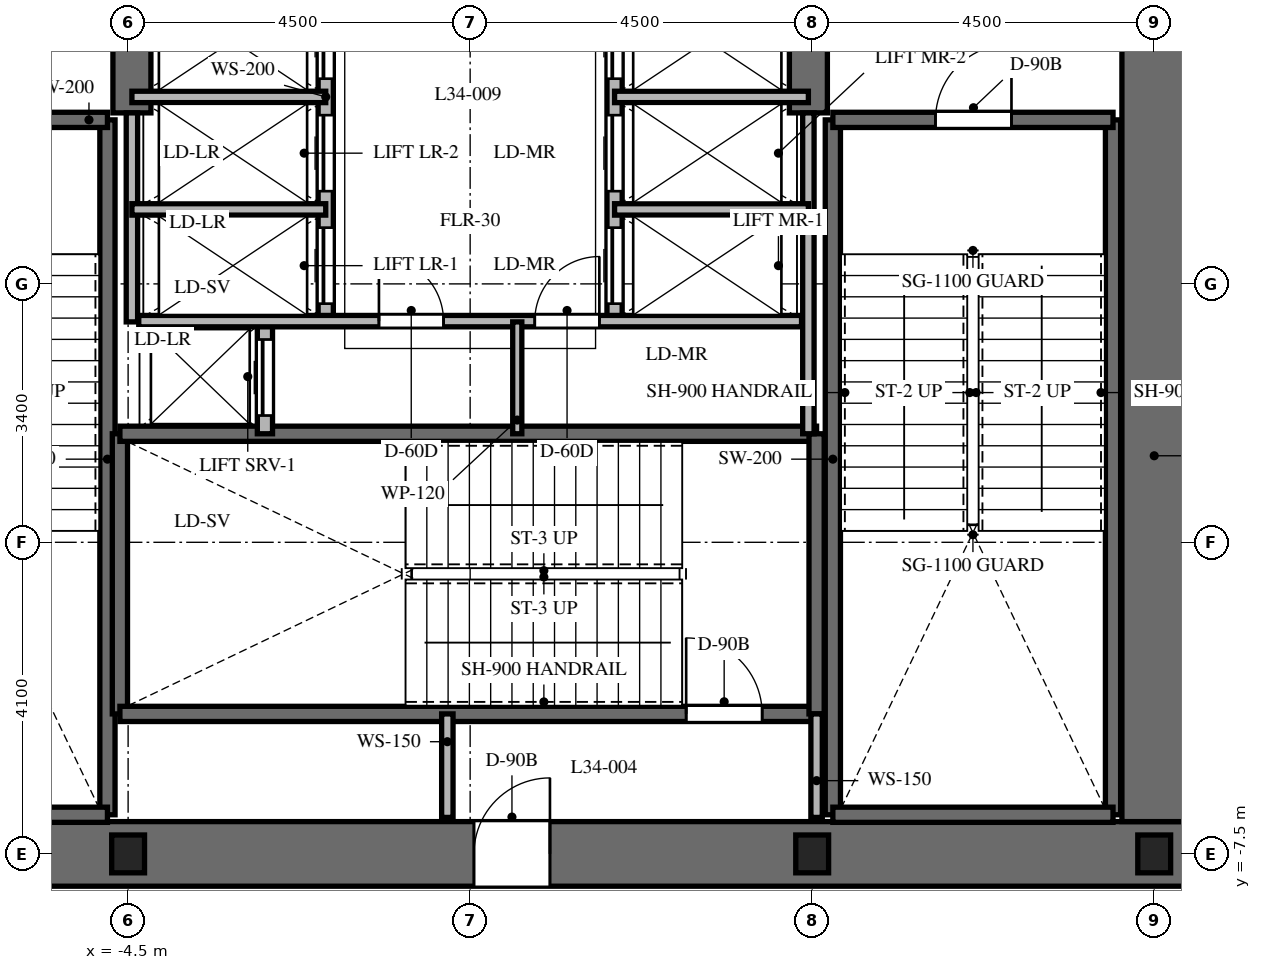
"""IFC4 building model, lengths in metres.
Left out: names, types, materials, properties, quantities, classifications, styles, units other than length and angle.
Written with IfcOpenShell. Run it as: python <this file> out.ifc"""

import sys

from ifc_helpers import new_model, si_unit, direction, frame, frame_2d, origin, origin_2d, place, context, subcontext, project, spatial, rectangle, i_section, extrude, element, fill, save


model = new_model("IFC4")
c1 = context("Model", 3, precision=1e-05, world=origin(), true_north=direction((0.0, 1.0)))
c2 = subcontext(c1, "Body", "Model", "MODEL_VIEW")
j1 = project(units=[si_unit("LENGTHUNIT", "METRE"), si_unit("PLANEANGLEUNIT", "RADIAN")], contexts=[c1])
p1 = place(None, origin())
s1 = spatial("IfcSite", under=j1, at=p1, CompositionType="ELEMENT")
p2 = place(p1, origin())
s2 = spatial("IfcBuilding", under=s1, at=p2, CompositionType="ELEMENT")
p3 = place(p2, frame((0.0, 0.0, 139.5)))
s3 = spatial("IfcBuildingStorey", under=s2, at=p3, CompositionType="ELEMENT", Elevation=139.5)
p4 = place(p3, frame((-9.425, -7.5, 0.0), z_axis=(0.0, 0.0, 1.0), x_axis=(1.0, 0.0, 0.0)))
e1 = element("IfcWall", 1, at=p4, inside=s3, PredefinedType="SHEAR", context=c2, shape_type="SweptSolid", body=[
    extrude(rectangle(XDim=18.85, YDim=0.85, at=frame_2d((9.425, 0.0))), origin(), (0.0, 0.0, 1.0), 4.8),
])
p5 = place(p4, frame((9.475, 0.0, 0.0)))
e2 = element("IfcOpeningElement", 2, at=p5, cuts=e1, PredefinedType="OPENING", context=c2, shape_type="SweptSolid", body=[
    extrude(rectangle(XDim=1.0, YDim=2.15, at=frame_2d((0.5, 1.075))), frame((0.0, 0.435, 0.0), z_axis=(0.0, -1.0, 0.0), x_axis=(1.0, 0.0, 0.0)), (0.0, 0.0, 1.0), 0.87),
])
p6 = place(p3, frame((9.0, -7.075, 0.0), z_axis=(0.0, 0.0, 1.0), x_axis=(0.0, 1.0, 0.0)))
e3 = element("IfcWall", 3, at=p6, inside=s3, PredefinedType="SHEAR", context=c2, shape_type="SweptSolid", body=[
    extrude(rectangle(XDim=14.15, YDim=0.85, at=frame_2d((7.075, 0.0))), origin(), (0.0, 0.0, 1.0), 4.8),
])
p7 = place(p6, frame((10.2, 0.0, 0.0)))
e4 = element("IfcOpeningElement", 4, at=p7, cuts=e3, PredefinedType="OPENING", context=c2, shape_type="SweptSolid", body=[
    extrude(rectangle(XDim=1.05, YDim=2.15, at=frame_2d((0.525, 1.075))), frame((0.0, 0.435, 0.0), z_axis=(0.0, -1.0, 0.0), x_axis=(1.0, 0.0, 0.0)), (0.0, 0.0, 1.0), 0.87),
])
for number, where, z_axis, x_axis in (
    (5, (-4.45, 2.25, 0.0), (0.0, 0.0, 1.0), (0.0, 1.0, 0.0)),
    (6, (4.45, 2.25, 0.0), (0.0, 0.0, 1.0), (0.0, 1.0, 0.0)),
):
    element("IfcWall", number, at=place(p3, frame(where, z_axis=z_axis, x_axis=x_axis)), inside=s3, PredefinedType="SHEAR", context=c2, shape_type="SweptSolid", body=[
        extrude(rectangle(XDim=4.825, YDim=0.5, at=frame_2d((2.413, 0.0))), origin(), (0.0, 0.0, 1.0), 4.8),
    ])
p8 = place(p3, frame((-4.772, -6.985, 0.0), z_axis=(0.0, 0.0, 1.0), x_axis=(0.0, 1.0, 0.0)))
e7 = element("IfcWall", 7, at=p8, inside=s3, PredefinedType="SHEAR", context=c2, shape_type="SweptSolid", body=[
    extrude(rectangle(XDim=9.143, YDim=0.2, at=frame_2d((4.572, 0.0))), origin(), (0.0, 0.0, 1.0), 4.8),
])
p9 = place(p3, frame((-8.458, -6.985, 0.0), z_axis=(0.0, 0.0, 1.0), x_axis=(1.0, 0.0, 0.0)))
e8 = element("IfcWall", 8, at=p9, inside=s3, PredefinedType="SHEAR", context=c2, shape_type="SweptSolid", body=[
    extrude(rectangle(XDim=3.686, YDim=0.2, at=frame_2d((1.843, 0.0))), origin(), (0.0, 0.0, 1.0), 4.8),
])
p10 = place(p3, frame((-8.458, 2.158, 0.0), z_axis=(0.0, 0.0, 1.0), x_axis=(1.0, 0.0, 0.0)))
e9 = element("IfcWall", 9, at=p10, inside=s3, PredefinedType="SHEAR", context=c2, shape_type="SweptSolid", body=[
    extrude(rectangle(XDim=3.686, YDim=0.2, at=frame_2d((1.843, 0.0))), origin(), (0.0, 0.0, 1.0), 4.8),
])
p11 = place(p10, frame((1.3, 0.0, 0.0)))
e10 = element("IfcOpeningElement", 10, at=p11, cuts=e9, PredefinedType="OPENING", context=c2, shape_type="SweptSolid", body=[
    extrude(rectangle(XDim=1.0, YDim=2.15, at=frame_2d((0.5, 1.075))), frame((0.0, 0.11, 0.0), z_axis=(0.0, -1.0, 0.0), x_axis=(1.0, 0.0, 0.0)), (0.0, 0.0, 1.0), 0.22),
])
for number, where, z_axis, x_axis in (
    (11, (4.772, -6.985, 0.0), (0.0, 0.0, 1.0), (0.0, 1.0, 0.0)),
    (12, (8.458, -6.985, 0.0), (0.0, 0.0, 1.0), (0.0, 1.0, 0.0)),
):
    element("IfcWall", number, at=place(p3, frame(where, z_axis=z_axis, x_axis=x_axis)), inside=s3, PredefinedType="SHEAR", context=c2, shape_type="SweptSolid", body=[
        extrude(rectangle(XDim=9.143, YDim=0.2, at=frame_2d((4.572, 0.0))), origin(), (0.0, 0.0, 1.0), 4.8),
    ])
p12 = place(p3, frame((4.772, -6.985, 0.0), z_axis=(0.0, 0.0, 1.0), x_axis=(1.0, 0.0, 0.0)))
e13 = element("IfcWall", 13, at=p12, inside=s3, PredefinedType="SHEAR", context=c2, shape_type="SweptSolid", body=[
    extrude(rectangle(XDim=3.686, YDim=0.2, at=frame_2d((1.843, 0.0))), origin(), (0.0, 0.0, 1.0), 4.8),
])
p13 = place(p3, frame((4.772, 2.158, 0.0), z_axis=(0.0, 0.0, 1.0), x_axis=(1.0, 0.0, 0.0)))
e14 = element("IfcWall", 14, at=p13, inside=s3, PredefinedType="SHEAR", context=c2, shape_type="SweptSolid", body=[
    extrude(rectangle(XDim=3.686, YDim=0.2, at=frame_2d((1.843, 0.0))), origin(), (0.0, 0.0, 1.0), 4.8),
])
p14 = place(p13, frame((1.35, 0.0, 0.0)))
e15 = element("IfcOpeningElement", 15, at=p14, cuts=e14, PredefinedType="OPENING", context=c2, shape_type="SweptSolid", body=[
    extrude(rectangle(XDim=1.0, YDim=2.15, at=frame_2d((0.5, 1.075))), frame((0.0, 0.11, 0.0), z_axis=(0.0, -1.0, 0.0), x_axis=(1.0, 0.0, 0.0)), (0.0, 0.0, 1.0), 0.22),
])
p15 = place(p3, frame((-4.608, -5.658, 0.0), z_axis=(0.0, 0.0, 1.0), x_axis=(0.0, 1.0, 0.0)))
e16 = element("IfcWall", 16, at=p15, inside=s3, PredefinedType="SHEAR", context=c2, shape_type="SweptSolid", body=[
    extrude(rectangle(XDim=3.686, YDim=0.2, at=frame_2d((1.843, 0.0))), origin(), (0.0, 0.0, 1.0), 4.8),
])
p16 = place(p3, frame((-4.608, -5.658, 0.0), z_axis=(0.0, 0.0, 1.0), x_axis=(1.0, 0.0, 0.0)))
e17 = element("IfcWall", 17, at=p16, inside=s3, PredefinedType="SHEAR", context=c2, shape_type="SweptSolid", body=[
    extrude(rectangle(XDim=9.166, YDim=0.2, at=frame_2d((4.583, 0.0))), origin(), (0.0, 0.0, 1.0), 4.8),
])
p17 = place(p16, frame((7.45, 0.0, 0.0)))
e18 = element("IfcOpeningElement", 18, at=p17, cuts=e17, PredefinedType="OPENING", context=c2, shape_type="SweptSolid", body=[
    extrude(rectangle(XDim=1.0, YDim=2.15, at=frame_2d((0.5, 1.075))), frame((0.0, 0.11, 0.0), z_axis=(0.0, -1.0, 0.0), x_axis=(1.0, 0.0, 0.0)), (0.0, 0.0, 1.0), 0.22),
])
p18 = place(p3, frame((-4.608, -1.972, 0.0), z_axis=(0.0, 0.0, 1.0), x_axis=(1.0, 0.0, 0.0)))
e19 = element("IfcWall", 19, at=p18, inside=s3, PredefinedType="SHEAR", context=c2, shape_type="SweptSolid", body=[
    extrude(rectangle(XDim=9.166, YDim=0.2, at=frame_2d((4.583, 0.0))), origin(), (0.0, 0.0, 1.0), 4.8),
])
p19 = place(p3, frame((4.558, -5.658, 0.0), z_axis=(0.0, 0.0, 1.0), x_axis=(0.0, 1.0, 0.0)))
e20 = element("IfcWall", 20, at=p19, inside=s3, PredefinedType="SHEAR", context=c2, shape_type="SweptSolid", body=[
    extrude(rectangle(XDim=3.686, YDim=0.2, at=frame_2d((1.843, 0.0))), origin(), (0.0, 0.0, 1.0), 4.8),
])
for number, where, z_axis, x_axis in (
    (21, (-4.5, -7.5, 0.0), (0.0, 0.0, 1.0), (1.0, 0.0, 0.0)),
    (22, (4.5, -7.5, 0.0), (0.0, 0.0, 1.0), (1.0, 0.0, 0.0)),
    (23, (9.0, -7.5, 0.0), (0.0, 0.0, 1.0), (1.0, 0.0, 0.0)),
):
    element("IfcColumn", number, at=place(p3, frame(where, z_axis=z_axis, x_axis=x_axis)), inside=s3, PredefinedType="COLUMN", context=c2, shape_type="SweptSolid", body=[
        extrude(i_section(OverallWidth=0.432, OverallDepth=0.498, WebThickness=0.056, FlangeThickness=0.089, at=origin_2d()), origin(), (0.0, 0.0, 1.0), 4.8),
    ])
for number, where, z_axis, x_axis in (
    (24, (-0.3, -7.02, 0.0), (0.0, 0.0, 1.0), (0.0, 1.0, 0.0)),
    (25, (4.558, -7.02, 0.0), (0.0, 0.0, 1.0), (0.0, 1.0, 0.0)),
):
    element("IfcWall", number, at=place(p3, frame(where, z_axis=z_axis, x_axis=x_axis)), inside=s3, PredefinedType="PARTITIONING", context=c2, shape_type="SweptSolid", body=[
        extrude(rectangle(XDim=1.362, YDim=0.15, at=frame_2d((0.681, 0.0))), origin(), (0.0, 0.0, 1.0), 4.5),
    ])
p20 = place(p3, frame((-2.7, -1.972, 0.0), z_axis=(0.0, 0.0, 1.0), x_axis=(0.0, 1.0, 0.0)))
e26 = element("IfcWall", 26, at=p20, inside=s3, PredefinedType="PARTITIONING", context=c2, shape_type="SweptSolid", body=[
    extrude(rectangle(XDim=1.472, YDim=0.2, at=frame_2d((0.736, 0.0))), origin(), (0.0, 0.0, 1.0), 4.5),
])
p21 = place(p20, frame((0.24, 0.0, 0.0)))
e27 = element("IfcOpeningElement", 27, at=p21, cuts=e26, PredefinedType="OPENING", context=c2, shape_type="SweptSolid", body=[
    extrude(rectangle(XDim=1.0, YDim=2.2, at=frame_2d((0.5, 1.1))), frame((0.0, 0.11, 0.0), z_axis=(0.0, -1.0, 0.0), x_axis=(1.0, 0.0, 0.0)), (0.0, 0.0, 1.0), 0.22),
])
p22 = place(p3, frame((-4.45, -0.5, 0.0), z_axis=(0.0, 0.0, 1.0), x_axis=(0.0, 1.0, 0.0)))
e28 = element("IfcWall", 28, at=p22, inside=s3, PredefinedType="PARTITIONING", context=c2, shape_type="SweptSolid", body=[
    extrude(rectangle(XDim=2.75, YDim=0.15, at=frame_2d((1.375, 0.0))), origin(), (0.0, 0.0, 1.0), 4.5),
])
p23 = place(p3, frame((4.45, -1.972, 0.0), z_axis=(0.0, 0.0, 1.0), x_axis=(0.0, 1.0, 0.0)))
e29 = element("IfcWall", 29, at=p23, inside=s3, PredefinedType="PARTITIONING", context=c2, shape_type="SweptSolid", body=[
    extrude(rectangle(XDim=4.222, YDim=0.15, at=frame_2d((2.111, 0.0))), origin(), (0.0, 0.0, 1.0), 4.5),
])
p24 = place(p3, frame((-1.9, -0.5, 0.0), z_axis=(0.0, 0.0, 1.0), x_axis=(0.0, 1.0, 0.0)))
e30 = element("IfcWall", 30, at=p24, inside=s3, PredefinedType="PARTITIONING", context=c2, shape_type="SweptSolid", body=[
    extrude(rectangle(XDim=4.44, YDim=0.2, at=frame_2d((2.22, 0.0))), origin(), (0.0, 0.0, 1.0), 4.5),
])
p25 = place(p24, frame((0.24, 0.0, 0.0)))
e31 = element("IfcOpeningElement", 31, at=p25, cuts=e30, PredefinedType="OPENING", context=c2, shape_type="SweptSolid", body=[
    extrude(rectangle(XDim=1.0, YDim=2.2, at=frame_2d((0.5, 1.1))), frame((0.0, 0.11, 0.0), z_axis=(0.0, -1.0, 0.0), x_axis=(1.0, 0.0, 0.0)), (0.0, 0.0, 1.0), 0.22),
])
p26 = place(p24, frame((1.72, 0.0, 0.0)))
e32 = element("IfcOpeningElement", 32, at=p26, cuts=e30, PredefinedType="OPENING", context=c2, shape_type="SweptSolid", body=[
    extrude(rectangle(XDim=1.0, YDim=2.2, at=frame_2d((0.5, 1.1))), frame((0.0, 0.11, 0.0), z_axis=(0.0, -1.0, 0.0), x_axis=(1.0, 0.0, 0.0)), (0.0, 0.0, 1.0), 0.22),
])
p27 = place(p24, frame((3.2, 0.0, 0.0)))
e33 = element("IfcOpeningElement", 33, at=p27, cuts=e30, PredefinedType="OPENING", context=c2, shape_type="SweptSolid", body=[
    extrude(rectangle(XDim=1.0, YDim=2.2, at=frame_2d((0.5, 1.1))), frame((0.0, 0.11, 0.0), z_axis=(0.0, -1.0, 0.0), x_axis=(1.0, 0.0, 0.0)), (0.0, 0.0, 1.0), 0.22),
])
for number, where, z_axis, x_axis in (
    (34, (-4.45, 0.98, 0.0), (0.0, 0.0, 1.0), (1.0, 0.0, 0.0)),
    (35, (-4.45, 2.46, 0.0), (0.0, 0.0, 1.0), (1.0, 0.0, 0.0)),
):
    element("IfcWall", number, at=place(p3, frame(where, z_axis=z_axis, x_axis=x_axis)), inside=s3, PredefinedType="PARTITIONING", context=c2, shape_type="SweptSolid", body=[
        extrude(rectangle(XDim=2.55, YDim=0.15, at=frame_2d((1.275, 0.0))), origin(), (0.0, 0.0, 1.0), 4.5),
    ])
p28 = place(p3, frame((1.9, -0.5, 0.0), z_axis=(0.0, 0.0, 1.0), x_axis=(0.0, 1.0, 0.0)))
e36 = element("IfcWall", 36, at=p28, inside=s3, PredefinedType="PARTITIONING", context=c2, shape_type="SweptSolid", body=[
    extrude(rectangle(XDim=4.44, YDim=0.2, at=frame_2d((2.22, 0.0))), origin(), (0.0, 0.0, 1.0), 4.5),
])
p29 = place(p28, frame((0.24, 0.0, 0.0)))
e37 = element("IfcOpeningElement", 37, at=p29, cuts=e36, PredefinedType="OPENING", context=c2, shape_type="SweptSolid", body=[
    extrude(rectangle(XDim=1.0, YDim=2.2, at=frame_2d((0.5, 1.1))), frame((0.0, 0.11, 0.0), z_axis=(0.0, -1.0, 0.0), x_axis=(1.0, 0.0, 0.0)), (0.0, 0.0, 1.0), 0.22),
])
p30 = place(p28, frame((1.72, 0.0, 0.0)))
e38 = element("IfcOpeningElement", 38, at=p30, cuts=e36, PredefinedType="OPENING", context=c2, shape_type="SweptSolid", body=[
    extrude(rectangle(XDim=1.0, YDim=2.2, at=frame_2d((0.5, 1.1))), frame((0.0, 0.11, 0.0), z_axis=(0.0, -1.0, 0.0), x_axis=(1.0, 0.0, 0.0)), (0.0, 0.0, 1.0), 0.22),
])
p31 = place(p28, frame((3.2, 0.0, 0.0)))
e39 = element("IfcOpeningElement", 39, at=p31, cuts=e36, PredefinedType="OPENING", context=c2, shape_type="SweptSolid", body=[
    extrude(rectangle(XDim=1.0, YDim=2.2, at=frame_2d((0.5, 1.1))), frame((0.0, 0.11, 0.0), z_axis=(0.0, -1.0, 0.0), x_axis=(1.0, 0.0, 0.0)), (0.0, 0.0, 1.0), 0.22),
])
for number, where, z_axis, x_axis in (
    (40, (1.9, 0.98, 0.0), (0.0, 0.0, 1.0), (1.0, 0.0, 0.0)),
    (41, (1.9, 2.46, 0.0), (0.0, 0.0, 1.0), (1.0, 0.0, 0.0)),
):
    element("IfcWall", number, at=place(p3, frame(where, z_axis=z_axis, x_axis=x_axis)), inside=s3, PredefinedType="PARTITIONING", context=c2, shape_type="SweptSolid", body=[
        extrude(rectangle(XDim=2.55, YDim=0.15, at=frame_2d((1.275, 0.0))), origin(), (0.0, 0.0, 1.0), 4.5),
    ])
p32 = place(p3, frame((-4.36, -0.49, 0.0), z_axis=(0.0, 0.0, 1.0), x_axis=(1.0, 0.0, 0.0)))
e42 = element("IfcWall", 42, at=p32, inside=s3, PredefinedType="PARTITIONING", context=c2, shape_type="SweptSolid", body=[
    extrude(rectangle(XDim=8.72, YDim=0.15, at=frame_2d((4.36, 0.0))), origin(), (0.0, 0.0, 1.0), 4.5),
])
p33 = place(p32, frame((3.16, 0.0, 0.0)))
e43 = element("IfcOpeningElement", 43, at=p33, cuts=e42, PredefinedType="OPENING", context=c2, shape_type="SweptSolid", body=[
    extrude(rectangle(XDim=0.85, YDim=2.03, at=frame_2d((0.425, 1.015))), frame((0.0, 0.085, 0.0), z_axis=(0.0, -1.0, 0.0), x_axis=(1.0, 0.0, 0.0)), (0.0, 0.0, 1.0), 0.17),
])
p34 = place(p32, frame((5.21, 0.0, 0.0)))
e44 = element("IfcOpeningElement", 44, at=p34, cuts=e42, PredefinedType="OPENING", context=c2, shape_type="SweptSolid", body=[
    extrude(rectangle(XDim=0.85, YDim=2.03, at=frame_2d((0.425, 1.015))), frame((0.0, 0.085, 0.0), z_axis=(0.0, -1.0, 0.0), x_axis=(1.0, 0.0, 0.0)), (0.0, 0.0, 1.0), 0.17),
])
p35 = place(p3, frame((0.62, -1.972, 0.0), z_axis=(0.0, 0.0, 1.0), x_axis=(0.0, 1.0, 0.0)))
e45 = element("IfcWall", 45, at=p35, inside=s3, PredefinedType="PARTITIONING", context=c2, shape_type="SweptSolid", body=[
    extrude(rectangle(XDim=1.472, YDim=0.12, at=frame_2d((0.736, 0.0))), origin(), (0.0, 0.0, 1.0), 4.5),
])
p36 = place(p14, origin())
e46 = element("IfcDoor", 46, at=p36, inside=s3, OperationType="SINGLE_SWING_RIGHT", PredefinedType="DOOR", context=c2, shape_type="SweptSolid", body=[
    extrude(rectangle(XDim=1.0, YDim=2.15, at=frame_2d((0.5, 1.075))), frame((0.0, 0.025, 0.0), z_axis=(0.0, -1.0, 0.0), x_axis=(1.0, 0.0, 0.0)), (0.0, 0.0, 1.0), 0.05),
])
fill(e15, e46)
p37 = place(p17, origin())
e47 = element("IfcDoor", 47, at=p37, inside=s3, OperationType="SINGLE_SWING_LEFT", PredefinedType="DOOR", context=c2, shape_type="SweptSolid", body=[
    extrude(rectangle(XDim=1.0, YDim=2.15, at=frame_2d((0.5, 1.075))), frame((0.0, 0.025, 0.0), z_axis=(0.0, -1.0, 0.0), x_axis=(1.0, 0.0, 0.0)), (0.0, 0.0, 1.0), 0.05),
])
fill(e18, e47)
p38 = place(p5, origin())
e48 = element("IfcDoor", 48, at=p38, inside=s3, OperationType="SINGLE_SWING_RIGHT", PredefinedType="DOOR", context=c2, shape_type="SweptSolid", body=[
    extrude(rectangle(XDim=1.0, YDim=2.15, at=frame_2d((0.5, 1.075))), frame((0.0, 0.025, 0.0), z_axis=(0.0, -1.0, 0.0), x_axis=(1.0, 0.0, 0.0)), (0.0, 0.0, 1.0), 0.05),
])
fill(e2, e48)
p39 = place(p21, origin())
e49 = element("IfcDoor", 49, at=p39, inside=s3, OperationType="SLIDING_TO_LEFT", PredefinedType="DOOR", context=c2, shape_type="SweptSolid", body=[
    extrude(rectangle(XDim=1.0, YDim=2.2, at=frame_2d((0.5, 1.1))), frame((0.0, 0.025, 0.0), z_axis=(0.0, -1.0, 0.0), x_axis=(1.0, 0.0, 0.0)), (0.0, 0.0, 1.0), 0.05),
])
fill(e27, e49)
p40 = place(p25, origin())
e50 = element("IfcDoor", 50, at=p40, inside=s3, OperationType="SLIDING_TO_LEFT", PredefinedType="DOOR", context=c2, shape_type="SweptSolid", body=[
    extrude(rectangle(XDim=1.0, YDim=2.2, at=frame_2d((0.5, 1.1))), frame((0.0, 0.025, 0.0), z_axis=(0.0, -1.0, 0.0), x_axis=(1.0, 0.0, 0.0)), (0.0, 0.0, 1.0), 0.05),
])
fill(e31, e50)
p41 = place(p26, origin())
e51 = element("IfcDoor", 51, at=p41, inside=s3, OperationType="SLIDING_TO_LEFT", PredefinedType="DOOR", context=c2, shape_type="SweptSolid", body=[
    extrude(rectangle(XDim=1.0, YDim=2.2, at=frame_2d((0.5, 1.1))), frame((0.0, 0.025, 0.0), z_axis=(0.0, -1.0, 0.0), x_axis=(1.0, 0.0, 0.0)), (0.0, 0.0, 1.0), 0.05),
])
fill(e32, e51)
p42 = place(p27, origin())
e52 = element("IfcDoor", 52, at=p42, inside=s3, OperationType="SLIDING_TO_LEFT", PredefinedType="DOOR", context=c2, shape_type="SweptSolid", body=[
    extrude(rectangle(XDim=1.0, YDim=2.2, at=frame_2d((0.5, 1.1))), frame((0.0, 0.025, 0.0), z_axis=(0.0, -1.0, 0.0), x_axis=(1.0, 0.0, 0.0)), (0.0, 0.0, 1.0), 0.05),
])
fill(e33, e52)
p43 = place(p29, origin())
e53 = element("IfcDoor", 53, at=p43, inside=s3, OperationType="SLIDING_TO_RIGHT", PredefinedType="DOOR", context=c2, shape_type="SweptSolid", body=[
    extrude(rectangle(XDim=1.0, YDim=2.2, at=frame_2d((0.5, 1.1))), frame((0.0, 0.025, 0.0), z_axis=(0.0, -1.0, 0.0), x_axis=(1.0, 0.0, 0.0)), (0.0, 0.0, 1.0), 0.05),
])
fill(e37, e53)
p44 = place(p30, origin())
e54 = element("IfcDoor", 54, at=p44, inside=s3, OperationType="SLIDING_TO_RIGHT", PredefinedType="DOOR", context=c2, shape_type="SweptSolid", body=[
    extrude(rectangle(XDim=1.0, YDim=2.2, at=frame_2d((0.5, 1.1))), frame((0.0, 0.025, 0.0), z_axis=(0.0, -1.0, 0.0), x_axis=(1.0, 0.0, 0.0)), (0.0, 0.0, 1.0), 0.05),
])
fill(e38, e54)
p45 = place(p31, origin())
e55 = element("IfcDoor", 55, at=p45, inside=s3, OperationType="SLIDING_TO_RIGHT", PredefinedType="DOOR", context=c2, shape_type="SweptSolid", body=[
    extrude(rectangle(XDim=1.0, YDim=2.2, at=frame_2d((0.5, 1.1))), frame((0.0, 0.025, 0.0), z_axis=(0.0, -1.0, 0.0), x_axis=(1.0, 0.0, 0.0)), (0.0, 0.0, 1.0), 0.05),
])
fill(e39, e55)
p46 = place(p33, origin())
e56 = element("IfcDoor", 56, at=p46, inside=s3, OperationType="SINGLE_SWING_LEFT", PredefinedType="DOOR", context=c2, shape_type="SweptSolid", body=[
    extrude(rectangle(XDim=0.85, YDim=2.03, at=frame_2d((0.425, 1.015))), frame((0.0, 0.025, 0.0), z_axis=(0.0, -1.0, 0.0), x_axis=(1.0, 0.0, 0.0)), (0.0, 0.0, 1.0), 0.05),
])
fill(e43, e56)
p47 = place(p34, origin())
e57 = element("IfcDoor", 57, at=p47, inside=s3, OperationType="SINGLE_SWING_RIGHT", PredefinedType="DOOR", context=c2, shape_type="SweptSolid", body=[
    extrude(rectangle(XDim=0.85, YDim=2.03, at=frame_2d((0.425, 1.015))), frame((0.0, 0.025, 0.0), z_axis=(0.0, -1.0, 0.0), x_axis=(1.0, 0.0, 0.0)), (0.0, 0.0, 1.0), 0.05),
])
fill(e44, e57)
save(model, sys.argv[1])
